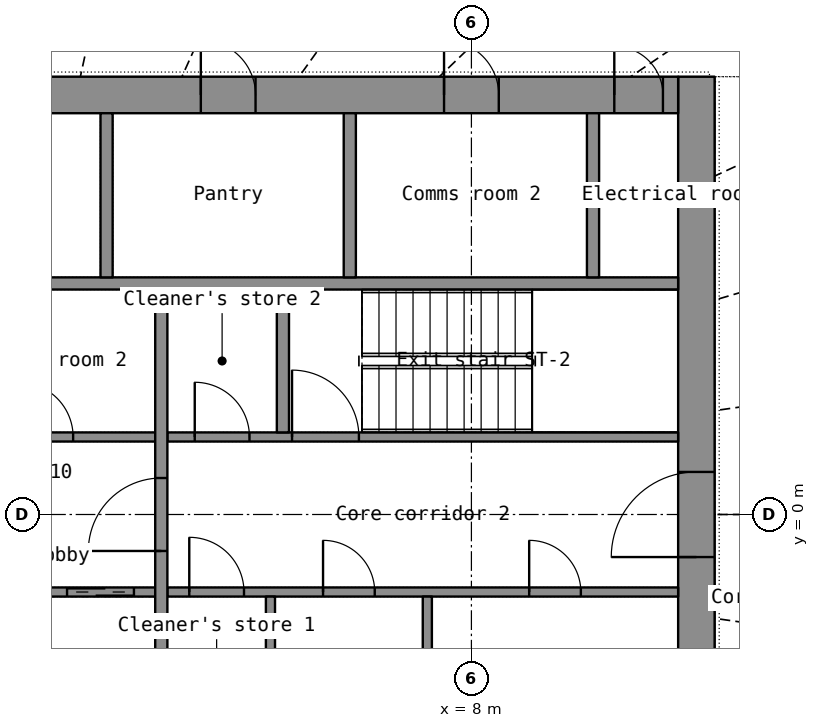
"""IFC4 building model, lengths in metres.
Left out: names, types, materials, properties, quantities, classifications, styles, units other than length and angle.
Written with IfcOpenShell. Run it as: python <this file> out.ifc"""

import sys

from ifc_helpers import new_model, si_unit, direction, frame, frame_2d, origin, place, context, subcontext, project, spatial, rectangle, extrude, element, fill, save


model = new_model("IFC4")
c1 = context("Model", 3, precision=1e-05, world=origin(), true_north=direction((0.0, 1.0)))
c2 = subcontext(c1, "Body", "Model", "MODEL_VIEW")
j1 = project(units=[si_unit("LENGTHUNIT", "METRE"), si_unit("PLANEANGLEUNIT", "RADIAN")], contexts=[c1])
p1 = place(None, origin())
s1 = spatial("IfcSite", under=j1, at=p1, CompositionType="ELEMENT")
p2 = place(p1, origin())
s2 = spatial("IfcBuilding", under=s1, at=p2, CompositionType="ELEMENT")
p3 = place(p2, frame((0.0, 0.0, 59.3)))
s3 = spatial("IfcBuildingStorey", under=s2, at=p3, CompositionType="ELEMENT", Elevation=59.3)
p4 = place(p3, frame((11.7, -7.2, 0.0), z_axis=(0.0, 0.0, 1.0), x_axis=(0.0, 1.0, 0.0)))
e1 = element("IfcWall", 1, at=p4, inside=s3, PredefinedType="SHEAR", context=c2, shape_type="SweptSolid", body=[
    extrude(rectangle(XDim=14.4, YDim=0.6, at=frame_2d((7.2, 0.0))), origin(), (0.0, 0.0, 1.0), 3.3),
])
p5 = place(p4, frame((6.5, 0.0, 0.0)))
e2 = element("IfcOpeningElement", 2, at=p5, cuts=e1, PredefinedType="OPENING", context=c2, shape_type="SweptSolid", body=[
    extrude(rectangle(XDim=1.4, YDim=2.2, at=frame_2d((0.7, 1.1))), frame((0.0, 0.31, 0.0), z_axis=(0.0, -1.0, 0.0), x_axis=(1.0, 0.0, 0.0)), (0.0, 0.0, 1.0), 0.62),
])
p6 = place(p3, frame((-11.4, 6.9, 0.0), z_axis=(0.0, 0.0, 1.0), x_axis=(1.0, 0.0, 0.0)))
e3 = element("IfcWall", 3, at=p6, inside=s3, PredefinedType="SHEAR", context=c2, shape_type="SweptSolid", body=[
    extrude(rectangle(XDim=22.8, YDim=0.6, at=frame_2d((11.4, 0.0))), origin(), (0.0, 0.0, 1.0), 3.3),
])
p7 = place(p6, frame((1.85, 0.0, 0.0)))
e4 = element("IfcOpeningElement", 4, at=p7, cuts=e3, PredefinedType="OPENING", context=c2, shape_type="SweptSolid", body=[
    extrude(rectangle(XDim=1.1, YDim=2.2, at=frame_2d((0.55, 1.1))), frame((0.0, 0.31, 0.0), z_axis=(0.0, -1.0, 0.0), x_axis=(1.0, 0.0, 0.0)), (0.0, 0.0, 1.0), 0.62),
])
p8 = place(p6, frame((8.95, 0.0, 0.0)))
e5 = element("IfcOpeningElement", 5, at=p8, cuts=e3, PredefinedType="OPENING", context=c2, shape_type="SweptSolid", body=[
    extrude(rectangle(XDim=0.9, YDim=2.1, at=frame_2d((0.45, 1.05))), frame((0.0, 0.31, 0.0), z_axis=(0.0, -1.0, 0.0), x_axis=(1.0, 0.0, 0.0)), (0.0, 0.0, 1.0), 0.62),
])
p9 = place(p6, frame((14.95, 0.0, 0.0)))
e6 = element("IfcOpeningElement", 6, at=p9, cuts=e3, PredefinedType="OPENING", context=c2, shape_type="SweptSolid", body=[
    extrude(rectangle(XDim=0.9, YDim=2.1, at=frame_2d((0.45, 1.05))), frame((0.0, 0.31, 0.0), z_axis=(0.0, -1.0, 0.0), x_axis=(1.0, 0.0, 0.0)), (0.0, 0.0, 1.0), 0.62),
])
p10 = place(p6, frame((18.95, 0.0, 0.0)))
e7 = element("IfcOpeningElement", 7, at=p10, cuts=e3, PredefinedType="OPENING", context=c2, shape_type="SweptSolid", body=[
    extrude(rectangle(XDim=0.9, YDim=2.1, at=frame_2d((0.45, 1.05))), frame((0.0, 0.31, 0.0), z_axis=(0.0, -1.0, 0.0), x_axis=(1.0, 0.0, 0.0)), (0.0, 0.0, 1.0), 0.62),
])
p11 = place(p6, frame((0.25, 0.0, 0.0)))
e8 = element("IfcOpeningElement", 8, at=p11, cuts=e3, PredefinedType="OPENING", context=c2, shape_type="SweptSolid", body=[
    extrude(rectangle(XDim=0.8, YDim=2.05, at=frame_2d((0.4, 1.025))), frame((0.0, 0.31, 0.0), z_axis=(0.0, -1.0, 0.0), x_axis=(1.0, 0.0, 0.0)), (0.0, 0.0, 1.0), 0.62),
])
p12 = place(p6, frame((21.75, 0.0, 0.0)))
e9 = element("IfcOpeningElement", 9, at=p12, cuts=e3, PredefinedType="OPENING", context=c2, shape_type="SweptSolid", body=[
    extrude(rectangle(XDim=0.8, YDim=2.05, at=frame_2d((0.4, 1.025))), frame((0.0, 0.31, 0.0), z_axis=(0.0, -1.0, 0.0), x_axis=(1.0, 0.0, 0.0)), (0.0, 0.0, 1.0), 0.62),
])
p13 = place(p3, frame((-11.4, 3.8, 0.0), z_axis=(0.0, 0.0, 1.0), x_axis=(1.0, 0.0, 0.0)))
e10 = element("IfcWall", 10, at=p13, inside=s3, PredefinedType="SHEAR", context=c2, shape_type="SweptSolid", body=[
    extrude(rectangle(XDim=22.8, YDim=0.2, at=frame_2d((11.4, 0.0))), origin(), (0.0, 0.0, 1.0), 3.3),
])
p14 = place(p3, frame((10.0, 3.9, 0.0), z_axis=(0.0, 0.0, 1.0), x_axis=(0.0, 1.0, 0.0)))
e11 = element("IfcWall", 11, at=p14, inside=s3, PredefinedType="SHEAR", context=c2, shape_type="SweptSolid", body=[
    extrude(rectangle(XDim=2.7, YDim=0.2, at=frame_2d((1.35, 0.0))), origin(), (0.0, 0.0, 1.0), 3.3),
])
for number, where, z_axis, x_axis in (
    (12, (2.0, 3.9, 0.0), (0.0, 0.0, 1.0), (0.0, 1.0, 0.0)),
    (13, (6.0, 3.9, 0.0), (0.0, 0.0, 1.0), (0.0, 1.0, 0.0)),
):
    element("IfcWall", number, at=place(p3, frame(where, z_axis=z_axis, x_axis=x_axis)), inside=s3, PredefinedType="PARTITIONING", context=c2, shape_type="SweptSolid", body=[
        extrude(rectangle(XDim=2.7, YDim=0.2, at=frame_2d((1.35, 0.0))), origin(), (0.0, 0.0, 1.0), 3.3),
    ])
p15 = place(p3, frame((-2.8, -1.275, 0.0), z_axis=(0.0, 0.0, 1.0), x_axis=(1.0, 0.0, 0.0)))
e14 = element("IfcWall", 14, at=p15, inside=s3, PredefinedType="SHEAR", context=c2, shape_type="SweptSolid", body=[
    extrude(rectangle(XDim=5.6, YDim=0.15, at=frame_2d((2.8, 0.0))), origin(), (0.0, 0.0, 1.0), 3.3),
])
p16 = place(p15, frame((4.15, 0.0, 0.0)))
e15 = element("IfcOpeningElement", 15, at=p16, cuts=e14, PredefinedType="OPENING", context=c2, shape_type="SweptSolid", body=[
    extrude(rectangle(XDim=1.1, YDim=2.2, at=frame_2d((0.55, 1.1))), frame((0.0, 0.085, 0.0), z_axis=(0.0, -1.0, 0.0), x_axis=(1.0, 0.0, 0.0)), (0.0, 0.0, 1.0), 0.17),
])
p17 = place(p15, frame((1.35, 0.0, 0.0)))
e16 = element("IfcOpeningElement", 16, at=p17, cuts=e14, PredefinedType="OPENING", context=c2, shape_type="SweptSolid", body=[
    extrude(rectangle(XDim=0.9, YDim=2.1, at=frame_2d((0.45, 1.05))), frame((0.0, 0.085, 0.0), z_axis=(0.0, -1.0, 0.0), x_axis=(1.0, 0.0, 0.0)), (0.0, 0.0, 1.0), 0.17),
])
p18 = place(p3, frame((3.0, -1.275, 0.0), z_axis=(0.0, 0.0, 1.0), x_axis=(1.0, 0.0, 0.0)))
e17 = element("IfcWall", 17, at=p18, inside=s3, PredefinedType="PARTITIONING", context=c2, shape_type="SweptSolid", body=[
    extrude(rectangle(XDim=8.4, YDim=0.15, at=frame_2d((4.2, 0.0))), origin(), (0.0, 0.0, 1.0), 3.3),
])
p19 = place(p18, frame((0.36, 0.0, 0.0)))
e18 = element("IfcOpeningElement", 18, at=p19, cuts=e17, PredefinedType="OPENING", context=c2, shape_type="SweptSolid", body=[
    extrude(rectangle(XDim=0.9, YDim=2.1, at=frame_2d((0.45, 1.05))), frame((0.0, 0.085, 0.0), z_axis=(0.0, -1.0, 0.0), x_axis=(1.0, 0.0, 0.0)), (0.0, 0.0, 1.0), 0.17),
])
p20 = place(p18, frame((2.56, 0.0, 0.0)))
e19 = element("IfcOpeningElement", 19, at=p20, cuts=e17, PredefinedType="OPENING", context=c2, shape_type="SweptSolid", body=[
    extrude(rectangle(XDim=0.85, YDim=2.1, at=frame_2d((0.425, 1.05))), frame((0.0, 0.085, 0.0), z_axis=(0.0, -1.0, 0.0), x_axis=(1.0, 0.0, 0.0)), (0.0, 0.0, 1.0), 0.17),
])
p21 = place(p18, frame((5.95, 0.0, 0.0)))
e20 = element("IfcOpeningElement", 20, at=p21, cuts=e17, PredefinedType="OPENING", context=c2, shape_type="SweptSolid", body=[
    extrude(rectangle(XDim=0.85, YDim=2.1, at=frame_2d((0.425, 1.05))), frame((0.0, 0.085, 0.0), z_axis=(0.0, -1.0, 0.0), x_axis=(1.0, 0.0, 0.0)), (0.0, 0.0, 1.0), 0.17),
])
p22 = place(p3, frame((-2.8, 1.275, 0.0), z_axis=(0.0, 0.0, 1.0), x_axis=(1.0, 0.0, 0.0)))
e21 = element("IfcWall", 21, at=p22, inside=s3, PredefinedType="SHEAR", context=c2, shape_type="SweptSolid", body=[
    extrude(rectangle(XDim=5.6, YDim=0.15, at=frame_2d((2.8, 0.0))), origin(), (0.0, 0.0, 1.0), 3.3),
])
p23 = place(p22, frame((0.35, 0.0, 0.0)))
e22 = element("IfcOpeningElement", 22, at=p23, cuts=e21, PredefinedType="OPENING", context=c2, shape_type="SweptSolid", body=[
    extrude(rectangle(XDim=1.1, YDim=2.2, at=frame_2d((0.55, 1.1))), frame((0.0, 0.085, 0.0), z_axis=(0.0, -1.0, 0.0), x_axis=(1.0, 0.0, 0.0)), (0.0, 0.0, 1.0), 0.17),
])
p24 = place(p22, frame((3.35, 0.0, 0.0)))
e23 = element("IfcOpeningElement", 23, at=p24, cuts=e21, PredefinedType="OPENING", context=c2, shape_type="SweptSolid", body=[
    extrude(rectangle(XDim=0.9, YDim=2.1, at=frame_2d((0.45, 1.05))), frame((0.0, 0.085, 0.0), z_axis=(0.0, -1.0, 0.0), x_axis=(1.0, 0.0, 0.0)), (0.0, 0.0, 1.0), 0.17),
])
p25 = place(p3, frame((3.0, 1.275, 0.0), z_axis=(0.0, 0.0, 1.0), x_axis=(1.0, 0.0, 0.0)))
e24 = element("IfcWall", 24, at=p25, inside=s3, PredefinedType="SHEAR", context=c2, shape_type="SweptSolid", body=[
    extrude(rectangle(XDim=8.4, YDim=0.15, at=frame_2d((4.2, 0.0))), origin(), (0.0, 0.0, 1.0), 3.3),
])
p26 = place(p25, frame((2.05, 0.0, 0.0)))
e25 = element("IfcOpeningElement", 25, at=p26, cuts=e24, PredefinedType="OPENING", context=c2, shape_type="SweptSolid", body=[
    extrude(rectangle(XDim=1.1, YDim=2.15, at=frame_2d((0.55, 1.075))), frame((0.0, 0.085, 0.0), z_axis=(0.0, -1.0, 0.0), x_axis=(1.0, 0.0, 0.0)), (0.0, 0.0, 1.0), 0.17),
])
p27 = place(p25, frame((0.45, 0.0, 0.0)))
e26 = element("IfcOpeningElement", 26, at=p27, cuts=e24, PredefinedType="OPENING", context=c2, shape_type="SweptSolid", body=[
    extrude(rectangle(XDim=0.9, YDim=2.1, at=frame_2d((0.45, 1.05))), frame((0.0, 0.085, 0.0), z_axis=(0.0, -1.0, 0.0), x_axis=(1.0, 0.0, 0.0)), (0.0, 0.0, 1.0), 0.17),
])
p28 = place(p3, frame((2.9, -3.7, 0.0), z_axis=(0.0, 0.0, 1.0), x_axis=(0.0, 1.0, 0.0)))
e27 = element("IfcWall", 27, at=p28, inside=s3, PredefinedType="SHEAR", context=c2, shape_type="SweptSolid", body=[
    extrude(rectangle(XDim=7.4, YDim=0.2, at=frame_2d((3.7, 0.0))), origin(), (0.0, 0.0, 1.0), 3.3),
])
p29 = place(p28, frame((3.1, 0.0, 0.0)))
e28 = element("IfcOpeningElement", 28, at=p29, cuts=e27, PredefinedType="OPENING", context=c2, shape_type="SweptSolid", body=[
    extrude(rectangle(XDim=1.2, YDim=2.2, at=frame_2d((0.6, 1.1))), frame((0.0, 0.11, 0.0), z_axis=(0.0, -1.0, 0.0), x_axis=(1.0, 0.0, 0.0)), (0.0, 0.0, 1.0), 0.22),
])
p30 = place(p3, frame((4.9, 1.35, 0.0), z_axis=(0.0, 0.0, 1.0), x_axis=(0.0, 1.0, 0.0)))
e29 = element("IfcWall", 29, at=p30, inside=s3, PredefinedType="SHEAR", context=c2, shape_type="SweptSolid", body=[
    extrude(rectangle(XDim=2.35, YDim=0.2, at=frame_2d((1.175, 0.0))), origin(), (0.0, 0.0, 1.0), 3.3),
])
for number, where, z_axis, x_axis in (
    (30, (4.695, -3.7, 0.0), (0.0, 0.0, 1.0), (0.0, 1.0, 0.0)),
    (31, (7.275, -3.7, 0.0), (0.0, 0.0, 1.0), (0.0, 1.0, 0.0)),
):
    element("IfcWall", number, at=place(p3, frame(where, z_axis=z_axis, x_axis=x_axis)), inside=s3, PredefinedType="PARTITIONING", context=c2, shape_type="SweptSolid", body=[
        extrude(rectangle(XDim=2.35, YDim=0.15, at=frame_2d((1.175, 0.0))), origin(), (0.0, 0.0, 1.0), 3.3),
    ])
p31 = place(p9, origin())
e32 = element("IfcDoor", 32, at=p31, inside=s3, OperationType="SINGLE_SWING_LEFT", PredefinedType="DOOR", context=c2, shape_type="SweptSolid", body=[
    extrude(rectangle(XDim=0.9, YDim=2.1, at=frame_2d((0.45, 1.05))), frame((0.0, 0.025, 0.0), z_axis=(0.0, -1.0, 0.0), x_axis=(1.0, 0.0, 0.0)), (0.0, 0.0, 1.0), 0.05),
])
fill(e6, e32)
p32 = place(p10, origin())
e33 = element("IfcDoor", 33, at=p32, inside=s3, OperationType="SINGLE_SWING_LEFT", PredefinedType="DOOR", context=c2, shape_type="SweptSolid", body=[
    extrude(rectangle(XDim=0.9, YDim=2.1, at=frame_2d((0.45, 1.05))), frame((0.0, 0.025, 0.0), z_axis=(0.0, -1.0, 0.0), x_axis=(1.0, 0.0, 0.0)), (0.0, 0.0, 1.0), 0.05),
])
fill(e7, e33)
p33 = place(p12, origin())
e34 = element("IfcDoor", 34, at=p33, inside=s3, OperationType="SINGLE_SWING_LEFT", PredefinedType="DOOR", context=c2, shape_type="SweptSolid", body=[
    extrude(rectangle(XDim=0.8, YDim=2.05, at=frame_2d((0.4, 1.025))), frame((0.0, 0.025, 0.0), z_axis=(0.0, -1.0, 0.0), x_axis=(1.0, 0.0, 0.0)), (0.0, 0.0, 1.0), 0.05),
])
fill(e9, e34)
p34 = place(p5, origin())
e35 = element("IfcDoor", 35, at=p34, inside=s3, OperationType="DOUBLE_DOOR_SINGLE_SWING", PredefinedType="DOOR", context=c2, shape_type="SweptSolid", body=[
    extrude(rectangle(XDim=1.4, YDim=2.2, at=frame_2d((0.7, 1.1))), frame((0.0, 0.025, 0.0), z_axis=(0.0, -1.0, 0.0), x_axis=(1.0, 0.0, 0.0)), (0.0, 0.0, 1.0), 0.05),
])
fill(e2, e35)
p35 = place(p29, origin())
e36 = element("IfcDoor", 36, at=p35, inside=s3, OperationType="SINGLE_SWING_LEFT", PredefinedType="DOOR", context=c2, shape_type="SweptSolid", body=[
    extrude(rectangle(XDim=1.2, YDim=2.2, at=frame_2d((0.6, 1.1))), frame((0.0, 0.025, 0.0), z_axis=(0.0, -1.0, 0.0), x_axis=(1.0, 0.0, 0.0)), (0.0, 0.0, 1.0), 0.05),
])
fill(e28, e36)
p36 = place(p16, origin())
e37 = element("IfcDoor", 37, at=p36, inside=s3, OperationType="DOUBLE_DOOR_SLIDING", PredefinedType="DOOR", context=c2, shape_type="SweptSolid", body=[
    extrude(rectangle(XDim=1.1, YDim=2.2, at=frame_2d((0.55, 1.1))), frame((0.0, 0.025, 0.0), z_axis=(0.0, -1.0, 0.0), x_axis=(1.0, 0.0, 0.0)), (0.0, 0.0, 1.0), 0.05),
])
fill(e15, e37)
p37 = place(p26, origin())
e38 = element("IfcDoor", 38, at=p37, inside=s3, OperationType="SINGLE_SWING_LEFT", PredefinedType="DOOR", context=c2, shape_type="SweptSolid", body=[
    extrude(rectangle(XDim=1.1, YDim=2.15, at=frame_2d((0.55, 1.075))), frame((0.0, 0.025, 0.0), z_axis=(0.0, -1.0, 0.0), x_axis=(1.0, 0.0, 0.0)), (0.0, 0.0, 1.0), 0.05),
])
fill(e25, e38)
p38 = place(p19, origin())
e39 = element("IfcDoor", 39, at=p38, inside=s3, OperationType="SINGLE_SWING_LEFT", PredefinedType="DOOR", context=c2, shape_type="SweptSolid", body=[
    extrude(rectangle(XDim=0.9, YDim=2.1, at=frame_2d((0.45, 1.05))), frame((0.0, 0.025, 0.0), z_axis=(0.0, -1.0, 0.0), x_axis=(1.0, 0.0, 0.0)), (0.0, 0.0, 1.0), 0.05),
])
fill(e18, e39)
p39 = place(p20, origin())
e40 = element("IfcDoor", 40, at=p39, inside=s3, OperationType="SINGLE_SWING_LEFT", PredefinedType="DOOR", context=c2, shape_type="SweptSolid", body=[
    extrude(rectangle(XDim=0.85, YDim=2.1, at=frame_2d((0.425, 1.05))), frame((0.0, 0.025, 0.0), z_axis=(0.0, -1.0, 0.0), x_axis=(1.0, 0.0, 0.0)), (0.0, 0.0, 1.0), 0.05),
])
fill(e19, e40)
p40 = place(p21, origin())
e41 = element("IfcDoor", 41, at=p40, inside=s3, OperationType="SINGLE_SWING_LEFT", PredefinedType="DOOR", context=c2, shape_type="SweptSolid", body=[
    extrude(rectangle(XDim=0.85, YDim=2.1, at=frame_2d((0.425, 1.05))), frame((0.0, 0.025, 0.0), z_axis=(0.0, -1.0, 0.0), x_axis=(1.0, 0.0, 0.0)), (0.0, 0.0, 1.0), 0.05),
])
fill(e20, e41)
p41 = place(p24, origin())
e42 = element("IfcDoor", 42, at=p41, inside=s3, OperationType="SINGLE_SWING_LEFT", PredefinedType="DOOR", context=c2, shape_type="SweptSolid", body=[
    extrude(rectangle(XDim=0.9, YDim=2.1, at=frame_2d((0.45, 1.05))), frame((0.0, 0.025, 0.0), z_axis=(0.0, -1.0, 0.0), x_axis=(1.0, 0.0, 0.0)), (0.0, 0.0, 1.0), 0.05),
])
fill(e23, e42)
p42 = place(p27, origin())
e43 = element("IfcDoor", 43, at=p42, inside=s3, OperationType="SINGLE_SWING_LEFT", PredefinedType="DOOR", context=c2, shape_type="SweptSolid", body=[
    extrude(rectangle(XDim=0.9, YDim=2.1, at=frame_2d((0.45, 1.05))), frame((0.0, 0.025, 0.0), z_axis=(0.0, -1.0, 0.0), x_axis=(1.0, 0.0, 0.0)), (0.0, 0.0, 1.0), 0.05),
])
fill(e26, e43)
save(model, sys.argv[1])
